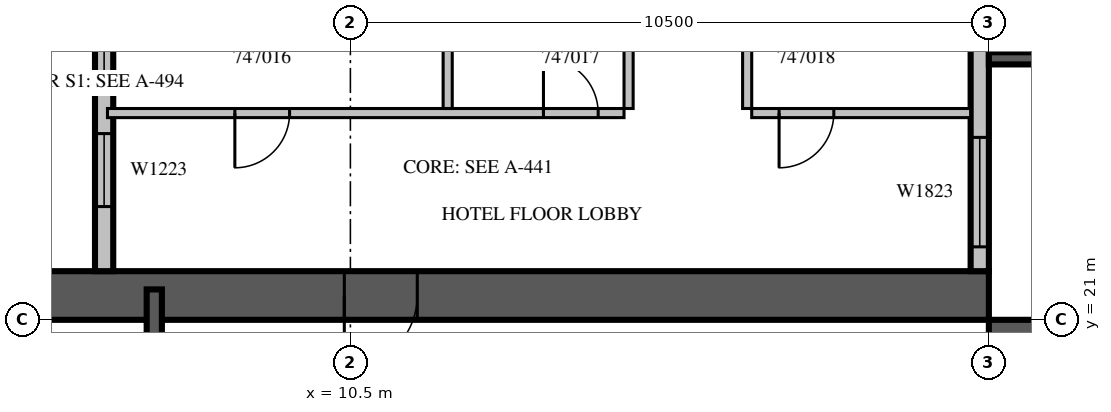
"""IFC4 building model, lengths in metres.
Left out: names, types, materials, properties, quantities, classifications, styles, units other than length and angle.
Written with IfcOpenShell. Run it as: python <this file> out.ifc"""

import sys

from ifc_helpers import new_model, si_unit, direction, frame, frame_2d, origin, place, context, subcontext, project, spatial, rectangle, extrude, source, transform, mapped, element, fill, save


model = new_model("IFC4")
c1 = context("Model", 3, precision=1e-05, world=origin(), true_north=direction((0.0, 1.0)))
c2 = subcontext(c1, "Body", "Model", "MODEL_VIEW")
j1 = project(units=[si_unit("LENGTHUNIT", "METRE"), si_unit("PLANEANGLEUNIT", "RADIAN")], contexts=[c1])
p1 = place(None, origin())
s1 = spatial("IfcSite", under=j1, at=p1, CompositionType="ELEMENT")
p2 = place(p1, origin())
s2 = spatial("IfcBuilding", under=s1, at=p2, CompositionType="ELEMENT")
p3 = place(p2, frame((0.0, 0.0, 212.0)))
s3 = spatial("IfcBuildingStorey", under=s2, at=p3, CompositionType="ELEMENT", Elevation=212.0)
m1 = source(origin(), c2, "Body", "SweptSolid", [
    extrude(rectangle(XDim=16.8, YDim=0.8, at=frame_2d((8.4, 0.0))), origin(), (0.0, 0.0, 1.0), 3.8),
])
p4 = place(p3, frame((21.4, 4.2, 0.0), z_axis=(0.0, 0.0, 1.0), x_axis=(0.0, 1.0, 0.0)))
e1 = element("IfcWall", 1, at=p4, inside=s3, PredefinedType="SHEAR", context=c2, shape_type="MappedRepresentation", body=[
    mapped(m1, transform((0.0, 0.0, 0.0), scale=1.0)),
])
m2 = source(origin(), c2, "Body", "SweptSolid", [
    extrude(rectangle(XDim=1.2, YDim=2.1, at=frame_2d((0.6, 1.05))), frame((0.0, 0.41, 0.0), z_axis=(0.0, -1.0, 0.0), x_axis=(1.0, 0.0, 0.0)), (0.0, 0.0, 1.0), 0.82),
])
p5 = place(p4, frame((14.7, 0.0, 0.0)))
e2 = element("IfcOpeningElement", 2, at=p5, cuts=e1, PredefinedType="OPENING", context=c2, shape_type="MappedRepresentation", body=[
    mapped(m2, transform((0.0, 0.0, 0.0), scale=1.0)),
])
p6 = place(p3, frame((4.2, 21.4, 0.0), z_axis=(0.0, 0.0, 1.0), x_axis=(1.0, 0.0, 0.0)))
e3 = element("IfcWall", 3, at=p6, inside=s3, PredefinedType="SHEAR", context=c2, shape_type="MappedRepresentation", body=[
    mapped(m1, transform((0.0, 0.0, 0.0), scale=1.0)),
])
p7 = place(p6, frame((6.2, 0.0, 0.0)))
e4 = element("IfcOpeningElement", 4, at=p7, cuts=e3, PredefinedType="OPENING", context=c2, shape_type="MappedRepresentation", body=[
    mapped(m2, transform((0.0, 0.0, 0.0), scale=1.0)),
])
m3 = source(origin(), c2, "Body", "SweptSolid", [
    extrude(rectangle(XDim=7.15, YDim=0.3, at=frame_2d((3.575, 0.0))), origin(), (0.0, 0.0, 1.0), 3.4),
])
p8 = place(p3, frame((20.85, 21.8, 0.0), z_axis=(0.0, 0.0, 1.0), x_axis=(0.0, 1.0, 0.0)))
e5 = element("IfcWall", 5, at=p8, inside=s3, PredefinedType="STANDARD", context=c2, shape_type="MappedRepresentation", body=[
    mapped(m3, transform((0.0, 0.0, 0.0), scale=1.0)),
])
m4 = source(origin(), c2, "Body", "SweptSolid", [
    extrude(rectangle(XDim=1.8, YDim=2.3, at=frame_2d((0.9, 1.15))), frame((0.0, 0.16, 0.0), z_axis=(0.0, -1.0, 0.0), x_axis=(1.0, 0.0, 0.0)), (0.0, 0.0, 1.0), 0.32),
])
p9 = place(p8, frame((0.4, 0.0, 0.6)))
e6 = element("IfcOpeningElement", 6, at=p9, cuts=e5, PredefinedType="OPENING", context=c2, shape_type="MappedRepresentation", body=[
    mapped(m4, transform((0.0, 0.0, 0.0), scale=1.0)),
])
m5 = source(origin(), c2, "Body", "SweptSolid", [
    extrude(rectangle(XDim=1.0, YDim=2.1, at=frame_2d((0.5, 1.05))), frame((0.0, 0.16, 0.0), z_axis=(0.0, -1.0, 0.0), x_axis=(1.0, 0.0, 0.0)), (0.0, 0.0, 1.0), 0.32),
])
p10 = place(p8, frame((5.0, 0.0, 0.0)))
e7 = element("IfcOpeningElement", 7, at=p10, cuts=e5, PredefinedType="OPENING", context=c2, shape_type="MappedRepresentation", body=[
    mapped(m5, transform((0.0, 0.0, 0.0), scale=1.0)),
])
m6 = source(origin(), c2, "Body", "SweptSolid", [
    extrude(rectangle(XDim=16.6, YDim=0.3, at=frame_2d((8.3, 0.0))), origin(), (0.0, 0.0, 1.0), 3.4),
])
p11 = place(p3, frame((6.45, 38.4, 0.0), z_axis=(0.0, 0.0, 1.0), x_axis=(0.0, -1.0, 0.0)))
e8 = element("IfcWall", 8, at=p11, inside=s3, PredefinedType="STANDARD", context=c2, shape_type="MappedRepresentation", body=[
    mapped(m6, transform((0.0, 0.0, 0.0), scale=1.0)),
])
p12 = place(p11, frame((1.15, 0.0, 0.6)))
e9 = element("IfcOpeningElement", 9, at=p12, cuts=e8, PredefinedType="OPENING", context=c2, shape_type="MappedRepresentation", body=[
    mapped(m4, transform((0.0, 0.0, 0.0), scale=1.0)),
])
p13 = place(p11, frame((9.438, 0.0, 0.6)))
e10 = element("IfcOpeningElement", 10, at=p13, cuts=e8, PredefinedType="OPENING", context=c2, shape_type="MappedRepresentation", body=[
    mapped(m4, transform((0.0, 0.0, 0.0), scale=1.0)),
])
m7 = source(origin(), c2, "Body", "SweptSolid", [
    extrude(rectangle(XDim=1.2, YDim=2.3, at=frame_2d((0.6, 1.15))), frame((0.0, 0.16, 0.0), z_axis=(0.0, -1.0, 0.0), x_axis=(1.0, 0.0, 0.0)), (0.0, 0.0, 1.0), 0.32),
])
p14 = place(p11, frame((14.338, 0.0, 0.6)))
e11 = element("IfcOpeningElement", 11, at=p14, cuts=e8, PredefinedType="OPENING", context=c2, shape_type="MappedRepresentation", body=[
    mapped(m7, transform((0.0, 0.0, 0.0), scale=1.0)),
])
p15 = place(p11, frame((11.887, 0.0, 0.6)))
e12 = element("IfcOpeningElement", 12, at=p15, cuts=e8, PredefinedType="OPENING", context=c2, shape_type="MappedRepresentation", body=[
    mapped(m4, transform((0.0, 0.0, 0.0), scale=1.0)),
])
p16 = place(p11, frame((5.45, 0.0, 0.0)))
e13 = element("IfcOpeningElement", 13, at=p16, cuts=e8, PredefinedType="OPENING", context=c2, shape_type="MappedRepresentation", body=[
    mapped(m5, transform((0.0, 0.0, 0.0), scale=1.0)),
])
m8 = source(origin(), c2, "Body", "SweptSolid", [
    extrude(rectangle(XDim=3.9, YDim=0.2, at=frame_2d((1.95, 0.0))), origin(), (0.0, 0.0, 1.0), 3.39),
])
p17 = place(p3, frame((21.0, 25.3, 0.0), z_axis=(0.0, 0.0, 1.0), x_axis=(1.0, 0.0, 0.0)))
e14 = element("IfcWall", 14, at=p17, inside=s3, PredefinedType="SOLIDWALL", context=c2, shape_type="MappedRepresentation", body=[
    mapped(m8, transform((0.0, 0.0, 0.0), scale=1.0)),
])
m9 = source(origin(), c2, "Body", "SweptSolid", [
    extrude(rectangle(XDim=2.4, YDim=2.3, at=frame_2d((1.2, 1.15))), frame((0.0, 0.11, 0.0), z_axis=(0.0, -1.0, 0.0), x_axis=(1.0, 0.0, 0.0)), (0.0, 0.0, 1.0), 0.22),
])
p18 = place(p17, frame((0.75, 0.0, 0.6)))
e15 = element("IfcOpeningElement", 15, at=p18, cuts=e14, PredefinedType="OPENING", context=c2, shape_type="MappedRepresentation", body=[
    mapped(m9, transform((0.0, 0.0, 0.0), scale=1.0)),
])
m10 = source(origin(), c2, "Body", "SweptSolid", [
    extrude(rectangle(XDim=6.6, YDim=0.25, at=frame_2d((3.3, 0.0))), origin(), (0.0, 0.0, 1.0), 3.4),
])
p19 = place(p3, frame((7.275, 14.9, 0.0), z_axis=(0.0, 0.0, 1.0), x_axis=(0.0, 1.0, 0.0)))
e16 = element("IfcWall", 16, at=p19, inside=s3, PredefinedType="SOLIDWALL", context=c2, shape_type="MappedRepresentation", body=[
    mapped(m10, transform((0.0, 0.0, 0.0), scale=1.0)),
])
m11 = source(origin(), c2, "Body", "SweptSolid", [
    extrude(rectangle(XDim=1.1, YDim=2.1, at=frame_2d((0.55, 1.05))), frame((0.0, 0.135, 0.0), z_axis=(0.0, -1.0, 0.0), x_axis=(1.0, 0.0, 0.0)), (0.0, 0.0, 1.0), 0.27),
])
p20 = place(p19, frame((0.15, 0.0, 0.0)))
e17 = element("IfcOpeningElement", 17, at=p20, cuts=e16, PredefinedType="OPENING", context=c2, shape_type="MappedRepresentation", body=[
    mapped(m11, transform((0.0, 0.0, 0.0), scale=1.0)),
])
m12 = source(origin(), c2, "Body", "SweptSolid", [
    extrude(rectangle(XDim=8.495, YDim=0.15, at=frame_2d((4.247, 0.0))), origin(), (0.0, 0.0, 1.0), 3.4),
])
p21 = place(p3, frame((6.505, 24.4, 0.0), z_axis=(0.0, 0.0, 1.0), x_axis=(1.0, 0.0, 0.0)))
e18 = element("IfcWall", 18, at=p21, inside=s3, PredefinedType="PARTITIONING", context=c2, shape_type="MappedRepresentation", body=[
    mapped(m12, transform((0.0, 0.0, 0.0), scale=1.0)),
])
m13 = source(origin(), c2, "Body", "SweptSolid", [
    extrude(rectangle(XDim=0.9, YDim=2.1, at=frame_2d((0.45, 1.05))), frame((0.0, 0.085, 0.0), z_axis=(0.0, -1.0, 0.0), x_axis=(1.0, 0.0, 0.0)), (0.0, 0.0, 1.0), 0.17),
])
p22 = place(p21, frame((2.095, 0.0, 0.0)))
e19 = element("IfcOpeningElement", 19, at=p22, cuts=e18, PredefinedType="OPENING", context=c2, shape_type="MappedRepresentation", body=[
    mapped(m13, transform((0.0, 0.0, 0.0), scale=1.0)),
])
p23 = place(p21, frame((7.17, 0.0, 0.0)))
e20 = element("IfcOpeningElement", 20, at=p23, cuts=e18, PredefinedType="OPENING", context=c2, shape_type="MappedRepresentation", body=[
    mapped(m13, transform((0.0, 0.0, 0.0), scale=1.0)),
])
m14 = source(origin(), c2, "Body", "SweptSolid", [
    extrude(rectangle(XDim=3.6, YDim=0.15, at=frame_2d((1.8, 0.0))), origin(), (0.0, 0.0, 1.0), 3.4),
])
p24 = place(p3, frame((17.1, 24.4, 0.0), z_axis=(0.0, 0.0, 1.0), x_axis=(1.0, 0.0, 0.0)))
e21 = element("IfcWall", 21, at=p24, inside=s3, PredefinedType="PARTITIONING", context=c2, shape_type="MappedRepresentation", body=[
    mapped(m14, transform((0.0, 0.0, 0.0), scale=1.0)),
])
p25 = place(p24, frame((0.45, 0.0, 0.0)))
e22 = element("IfcOpeningElement", 22, at=p25, cuts=e21, PredefinedType="OPENING", context=c2, shape_type="MappedRepresentation", body=[
    mapped(m13, transform((0.0, 0.0, 0.0), scale=1.0)),
])
m15 = source(origin(), c2, "Body", "SweptSolid", [
    extrude(rectangle(XDim=4.85, YDim=0.15, at=frame_2d((2.425, 0.0))), origin(), (0.0, 0.0, 1.0), 3.4),
])
for number, where, z_axis, x_axis in (
    (23, (12.1, 24.475, 0.0), (0.0, 0.0, 1.0), (0.0, 1.0, 0.0)),
    (24, (15.075, 24.475, 0.0), (0.0, 0.0, 1.0), (0.0, 1.0, 0.0)),
    (25, (17.025, 29.325, 0.0), (0.0, 0.0, 1.0), (0.0, -1.0, 0.0)),
):
    element("IfcWall", number, at=place(p3, frame(where, z_axis=z_axis, x_axis=x_axis)), inside=s3, PredefinedType="PARTITIONING", context=c2, shape_type="MappedRepresentation", body=[
        mapped(m15, transform((0.0, 0.0, 0.0), scale=1.0)),
    ])
m16 = source(origin(), c2, "Body", "SweptSolid", [
    extrude(rectangle(XDim=1.8, YDim=2.3, at=frame_2d((0.9, 1.15))), frame((0.0, 0.03, 0.0), z_axis=(0.0, -1.0, 0.0), x_axis=(1.0, 0.0, 0.0)), (0.0, 0.0, 1.0), 0.06),
])
p26 = place(p9, origin())
e26 = element("IfcWindow", 26, at=p26, inside=s3, PartitioningType="SINGLE_PANEL", PredefinedType="WINDOW", context=c2, shape_type="MappedRepresentation", body=[
    mapped(m16, transform((0.0, 0.0, 0.0), scale=1.0)),
])
fill(e6, e26)
m17 = source(origin(), c2, "Body", "SweptSolid", [
    extrude(rectangle(XDim=1.2, YDim=2.3, at=frame_2d((0.6, 1.15))), frame((0.0, 0.03, 0.0), z_axis=(0.0, -1.0, 0.0), x_axis=(1.0, 0.0, 0.0)), (0.0, 0.0, 1.0), 0.06),
])
p27 = place(p14, origin())
e27 = element("IfcWindow", 27, at=p27, inside=s3, PartitioningType="SINGLE_PANEL", PredefinedType="WINDOW", context=c2, shape_type="MappedRepresentation", body=[
    mapped(m17, transform((0.0, 0.0, 0.0), scale=1.0)),
])
fill(e11, e27)
p28 = place(p15, origin())
e28 = element("IfcWindow", 28, at=p28, inside=s3, PartitioningType="SINGLE_PANEL", PredefinedType="WINDOW", context=c2, shape_type="MappedRepresentation", body=[
    mapped(m16, transform((0.0, 0.0, 0.0), scale=1.0)),
])
fill(e12, e28)
m18 = source(origin(), c2, "Body", "SweptSolid", [
    extrude(rectangle(XDim=1.2, YDim=2.1, at=frame_2d((0.6, 1.05))), frame((0.0, 0.025, 0.0), z_axis=(0.0, -1.0, 0.0), x_axis=(1.0, 0.0, 0.0)), (0.0, 0.0, 1.0), 0.05),
])
p29 = place(p7, origin())
e29 = element("IfcDoor", 29, at=p29, inside=s3, OperationType="SINGLE_SWING_RIGHT", PredefinedType="DOOR", context=c2, shape_type="MappedRepresentation", body=[
    mapped(m18, transform((0.0, 0.0, 0.0), scale=1.0)),
])
fill(e4, e29)
m19 = source(origin(), c2, "Body", "SweptSolid", [
    extrude(rectangle(XDim=0.9, YDim=2.1, at=frame_2d((0.45, 1.05))), frame((0.0, 0.025, 0.0), z_axis=(0.0, -1.0, 0.0), x_axis=(1.0, 0.0, 0.0)), (0.0, 0.0, 1.0), 0.05),
])
p30 = place(p22, origin())
e30 = element("IfcDoor", 30, at=p30, inside=s3, OperationType="SINGLE_SWING_RIGHT", PredefinedType="DOOR", context=c2, shape_type="MappedRepresentation", body=[
    mapped(m19, transform((0.0, 0.0, 0.0), scale=1.0)),
])
fill(e19, e30)
p31 = place(p23, origin())
e31 = element("IfcDoor", 31, at=p31, inside=s3, OperationType="SINGLE_SWING_LEFT", PredefinedType="DOOR", context=c2, shape_type="MappedRepresentation", body=[
    mapped(m19, transform((0.0, 0.0, 0.0), scale=1.0)),
])
fill(e20, e31)
p32 = place(p25, origin())
e32 = element("IfcDoor", 32, at=p32, inside=s3, OperationType="SINGLE_SWING_RIGHT", PredefinedType="DOOR", context=c2, shape_type="MappedRepresentation", body=[
    mapped(m19, transform((0.0, 0.0, 0.0), scale=1.0)),
])
fill(e22, e32)
save(model, sys.argv[1])
